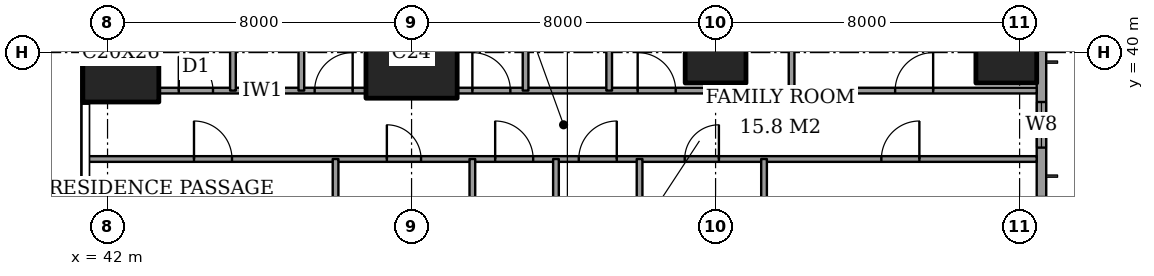
"""IFC4 building model, lengths in metres.
Left out: names, types, materials, properties, quantities, classifications, styles, units other than length and angle.
Written with IfcOpenShell. Run it as: python <this file> out.ifc"""

import sys

from ifc_helpers import new_model, si_unit, direction, frame, frame_2d, origin, origin_2d, place, context, subcontext, project, spatial, rectangle, extrude, element, fill, save


model = new_model("IFC4")
c1 = context("Model", 3, precision=1e-05, world=origin(), true_north=direction((0.0, 1.0)))
c2 = subcontext(c1, "Body", "Model", "MODEL_VIEW")
j1 = project(units=[si_unit("LENGTHUNIT", "METRE"), si_unit("PLANEANGLEUNIT", "RADIAN")], contexts=[c1])
p1 = place(None, origin())
s1 = spatial("IfcSite", under=j1, at=p1, CompositionType="ELEMENT")
p2 = place(p1, origin())
s2 = spatial("IfcBuilding", under=s1, at=p2, CompositionType="ELEMENT")
p3 = place(p2, frame((0.0, 0.0, 262.8)))
s3 = spatial("IfcBuildingStorey", under=s2, at=p3, CompositionType="ELEMENT", Elevation=262.8)
p4 = place(p3, frame((42.35, 40.0, 0.0), z_axis=(0.0, 0.0, 1.0), x_axis=(1.0, 0.0, 0.0)))
e1 = element("IfcColumn", 1, at=p4, inside=s3, PredefinedType="COLUMN", context=c2, shape_type="SweptSolid", body=[
    extrude(rectangle(XDim=2.0, YDim=2.6, at=origin_2d()), origin(), (0.0, 0.0, 1.0), 3.6),
])
p5 = place(p3, frame((50.0, 40.0, 0.0), z_axis=(0.0, 0.0, 1.0), x_axis=(1.0, 0.0, 0.0)))
e2 = element("IfcColumn", 2, at=p5, inside=s3, PredefinedType="COLUMN", context=c2, shape_type="SweptSolid", body=[
    extrude(rectangle(XDim=2.4, YDim=2.4, at=origin_2d()), origin(), (0.0, 0.0, 1.0), 3.6),
])
for number, where, z_axis, x_axis in (
    (3, (58.0, 40.0, 0.0), (0.0, 0.0, 1.0), (1.0, 0.0, 0.0)),
    (4, (65.65, 40.0, 0.0), (0.0, 0.0, 1.0), (1.0, 0.0, 0.0)),
):
    element("IfcColumn", number, at=place(p3, frame(where, z_axis=z_axis, x_axis=x_axis)), inside=s3, PredefinedType="COLUMN", context=c2, shape_type="SweptSolid", body=[
        extrude(rectangle(XDim=1.6, YDim=1.6, at=origin_2d()), origin(), (0.0, 0.0, 1.0), 3.6),
    ])
p6 = place(p3, frame((66.575, 3.175, 0.0), z_axis=(0.0, 0.0, 1.0), x_axis=(0.0, 1.0, 0.0)))
e5 = element("IfcWall", 5, at=p6, inside=s3, PredefinedType="SOLIDWALL", context=c2, shape_type="SweptSolid", body=[
    extrude(rectangle(XDim=41.65, YDim=0.25, at=frame_2d((20.825, 0.0))), origin(), (0.0, 0.0, 1.0), 3.6),
])
p7 = place(p6, frame((0.875, 0.0, 0.6)))
e6 = element("IfcOpeningElement", 6, at=p7, cuts=e5, PredefinedType="OPENING", context=c2, shape_type="SweptSolid", body=[
    extrude(rectangle(XDim=2.4, YDim=2.0, at=frame_2d((1.2, 1.0))), frame((0.0, 0.135, 0.0), z_axis=(0.0, -1.0, 0.0), x_axis=(1.0, 0.0, 0.0)), (0.0, 0.0, 1.0), 0.27),
])
p8 = place(p6, frame((6.0, 0.0, 0.6)))
e7 = element("IfcOpeningElement", 7, at=p8, cuts=e5, PredefinedType="OPENING", context=c2, shape_type="SweptSolid", body=[
    extrude(rectangle(XDim=1.2, YDim=2.0, at=frame_2d((0.6, 1.0))), frame((0.0, 0.135, 0.0), z_axis=(0.0, -1.0, 0.0), x_axis=(1.0, 0.0, 0.0)), (0.0, 0.0, 1.0), 0.27),
])
p9 = place(p6, frame((8.525, 0.0, 0.6)))
e8 = element("IfcOpeningElement", 8, at=p9, cuts=e5, PredefinedType="OPENING", context=c2, shape_type="SweptSolid", body=[
    extrude(rectangle(XDim=2.4, YDim=2.0, at=frame_2d((1.2, 1.0))), frame((0.0, 0.135, 0.0), z_axis=(0.0, -1.0, 0.0), x_axis=(1.0, 0.0, 0.0)), (0.0, 0.0, 1.0), 0.27),
])
p10 = place(p6, frame((15.625, 0.0, 0.6)))
e9 = element("IfcOpeningElement", 9, at=p10, cuts=e5, PredefinedType="OPENING", context=c2, shape_type="SweptSolid", body=[
    extrude(rectangle(XDim=2.4, YDim=2.0, at=frame_2d((1.2, 1.0))), frame((0.0, 0.135, 0.0), z_axis=(0.0, -1.0, 0.0), x_axis=(1.0, 0.0, 0.0)), (0.0, 0.0, 1.0), 0.27),
])
p11 = place(p6, frame((23.525, 0.0, 0.6)))
e10 = element("IfcOpeningElement", 10, at=p11, cuts=e5, PredefinedType="OPENING", context=c2, shape_type="SweptSolid", body=[
    extrude(rectangle(XDim=2.4, YDim=2.0, at=frame_2d((1.2, 1.0))), frame((0.0, 0.135, 0.0), z_axis=(0.0, -1.0, 0.0), x_axis=(1.0, 0.0, 0.0)), (0.0, 0.0, 1.0), 0.27),
])
p12 = place(p6, frame((30.625, 0.0, 0.6)))
e11 = element("IfcOpeningElement", 11, at=p12, cuts=e5, PredefinedType="OPENING", context=c2, shape_type="SweptSolid", body=[
    extrude(rectangle(XDim=2.4, YDim=2.0, at=frame_2d((1.2, 1.0))), frame((0.0, 0.135, 0.0), z_axis=(0.0, -1.0, 0.0), x_axis=(1.0, 0.0, 0.0)), (0.0, 0.0, 1.0), 0.27),
])
p13 = place(p6, frame((34.325, 0.0, 0.6)))
e12 = element("IfcOpeningElement", 12, at=p13, cuts=e5, PredefinedType="OPENING", context=c2, shape_type="SweptSolid", body=[
    extrude(rectangle(XDim=1.2, YDim=2.0, at=frame_2d((0.6, 1.0))), frame((0.0, 0.135, 0.0), z_axis=(0.0, -1.0, 0.0), x_axis=(1.0, 0.0, 0.0)), (0.0, 0.0, 1.0), 0.27),
])
p14 = place(p6, frame((38.375, 0.0, 0.6)))
e13 = element("IfcOpeningElement", 13, at=p14, cuts=e5, PredefinedType="OPENING", context=c2, shape_type="SweptSolid", body=[
    extrude(rectangle(XDim=2.4, YDim=2.0, at=frame_2d((1.2, 1.0))), frame((0.0, 0.135, 0.0), z_axis=(0.0, -1.0, 0.0), x_axis=(1.0, 0.0, 0.0)), (0.0, 0.0, 1.0), 0.27),
])
p15 = place(p3, frame((41.439, 37.2, 0.0), z_axis=(0.0, 0.0, 1.0), x_axis=(1.0, 0.0, 0.0)))
e14 = element("IfcWall", 14, at=p15, inside=s3, PredefinedType="PARTITIONING", context=c2, shape_type="SweptSolid", body=[
    extrude(rectangle(XDim=25.011, YDim=0.15, at=frame_2d((12.505, 0.0))), origin(), (0.0, 0.0, 1.0), 3.35),
])
p16 = place(p15, frame((10.761, 0.0, 0.0)))
e15 = element("IfcOpeningElement", 15, at=p16, cuts=e14, PredefinedType="OPENING", context=c2, shape_type="SweptSolid", body=[
    extrude(rectangle(XDim=1.0, YDim=2.1, at=frame_2d((0.5, 1.05))), frame((0.0, 0.085, 0.0), z_axis=(0.0, -1.0, 0.0), x_axis=(1.0, 0.0, 0.0)), (0.0, 0.0, 1.0), 0.17),
])
p17 = place(p15, frame((20.924, 0.0, 0.0)))
e16 = element("IfcOpeningElement", 16, at=p17, cuts=e14, PredefinedType="OPENING", context=c2, shape_type="SweptSolid", body=[
    extrude(rectangle(XDim=1.0, YDim=2.1, at=frame_2d((0.5, 1.05))), frame((0.0, 0.085, 0.0), z_axis=(0.0, -1.0, 0.0), x_axis=(1.0, 0.0, 0.0)), (0.0, 0.0, 1.0), 0.17),
])
p18 = place(p15, frame((15.749, 0.0, 0.0)))
e17 = element("IfcOpeningElement", 17, at=p18, cuts=e14, PredefinedType="OPENING", context=c2, shape_type="SweptSolid", body=[
    extrude(rectangle(XDim=0.9, YDim=2.1, at=frame_2d((0.45, 1.05))), frame((0.0, 0.085, 0.0), z_axis=(0.0, -1.0, 0.0), x_axis=(1.0, 0.0, 0.0)), (0.0, 0.0, 1.0), 0.17),
])
p19 = place(p15, frame((12.961, 0.0, 0.0)))
e18 = element("IfcOpeningElement", 18, at=p19, cuts=e14, PredefinedType="OPENING", context=c2, shape_type="SweptSolid", body=[
    extrude(rectangle(XDim=1.0, YDim=2.1, at=frame_2d((0.5, 1.05))), frame((0.0, 0.085, 0.0), z_axis=(0.0, -1.0, 0.0), x_axis=(1.0, 0.0, 0.0)), (0.0, 0.0, 1.0), 0.17),
])
p20 = place(p15, frame((7.911, 0.0, 0.0)))
e19 = element("IfcOpeningElement", 19, at=p20, cuts=e14, PredefinedType="OPENING", context=c2, shape_type="SweptSolid", body=[
    extrude(rectangle(XDim=0.9, YDim=2.1, at=frame_2d((0.45, 1.05))), frame((0.0, 0.085, 0.0), z_axis=(0.0, -1.0, 0.0), x_axis=(1.0, 0.0, 0.0)), (0.0, 0.0, 1.0), 0.17),
])
p21 = place(p15, frame((2.836, 0.0, 0.0)))
e20 = element("IfcOpeningElement", 20, at=p21, cuts=e14, PredefinedType="OPENING", context=c2, shape_type="SweptSolid", body=[
    extrude(rectangle(XDim=1.0, YDim=2.1, at=frame_2d((0.5, 1.05))), frame((0.0, 0.085, 0.0), z_axis=(0.0, -1.0, 0.0), x_axis=(1.0, 0.0, 0.0)), (0.0, 0.0, 1.0), 0.17),
])
p22 = place(p3, frame((43.35, 39.0, 0.0), z_axis=(0.0, 0.0, 1.0), x_axis=(1.0, 0.0, 0.0)))
e21 = element("IfcWall", 21, at=p22, inside=s3, PredefinedType="PARTITIONING", context=c2, shape_type="SweptSolid", body=[
    extrude(rectangle(XDim=5.45, YDim=0.15, at=frame_2d((2.725, 0.0))), origin(), (0.0, 0.0, 1.0), 3.35),
])
p23 = place(p22, frame((4.1, 0.0, 0.0)))
e22 = element("IfcOpeningElement", 22, at=p23, cuts=e21, PredefinedType="OPENING", context=c2, shape_type="SweptSolid", body=[
    extrude(rectangle(XDim=1.0, YDim=2.1, at=frame_2d((0.5, 1.05))), frame((0.0, 0.085, 0.0), z_axis=(0.0, -1.0, 0.0), x_axis=(1.0, 0.0, 0.0)), (0.0, 0.0, 1.0), 0.17),
])
p24 = place(p22, frame((0.525, 0.0, 0.0)))
e23 = element("IfcOpeningElement", 23, at=p24, cuts=e21, PredefinedType="OPENING", context=c2, shape_type="SweptSolid", body=[
    extrude(rectangle(XDim=0.9, YDim=2.1, at=frame_2d((0.45, 1.05))), frame((0.0, 0.085, 0.0), z_axis=(0.0, -1.0, 0.0), x_axis=(1.0, 0.0, 0.0)), (0.0, 0.0, 1.0), 0.17),
])
p25 = place(p3, frame((51.2, 39.0, 0.0), z_axis=(0.0, 0.0, 1.0), x_axis=(1.0, 0.0, 0.0)))
e24 = element("IfcWall", 24, at=p25, inside=s3, PredefinedType="PARTITIONING", context=c2, shape_type="SweptSolid", body=[
    extrude(rectangle(XDim=15.25, YDim=0.15, at=frame_2d((7.625, 0.0))), origin(), (0.0, 0.0, 1.0), 3.35),
])
p26 = place(p25, frame((11.525, 0.0, 0.0)))
e25 = element("IfcOpeningElement", 25, at=p26, cuts=e24, PredefinedType="OPENING", context=c2, shape_type="SweptSolid", body=[
    extrude(rectangle(XDim=1.0, YDim=2.1, at=frame_2d((0.5, 1.05))), frame((0.0, 0.085, 0.0), z_axis=(0.0, -1.0, 0.0), x_axis=(1.0, 0.0, 0.0)), (0.0, 0.0, 1.0), 0.17),
])
p27 = place(p25, frame((4.75, 0.0, 0.0)))
e26 = element("IfcOpeningElement", 26, at=p27, cuts=e24, PredefinedType="OPENING", context=c2, shape_type="SweptSolid", body=[
    extrude(rectangle(XDim=1.0, YDim=2.1, at=frame_2d((0.5, 1.05))), frame((0.0, 0.085, 0.0), z_axis=(0.0, -1.0, 0.0), x_axis=(1.0, 0.0, 0.0)), (0.0, 0.0, 1.0), 0.17),
])
p28 = place(p25, frame((0.4, 0.0, 0.0)))
e27 = element("IfcOpeningElement", 27, at=p28, cuts=e24, PredefinedType="OPENING", context=c2, shape_type="SweptSolid", body=[
    extrude(rectangle(XDim=1.0, YDim=2.1, at=frame_2d((0.5, 1.05))), frame((0.0, 0.085, 0.0), z_axis=(0.0, -1.0, 0.0), x_axis=(1.0, 0.0, 0.0)), (0.0, 0.0, 1.0), 0.17),
])
p29 = place(p3, frame((45.3, 39.0, 0.0), z_axis=(0.0, 0.0, 1.0), x_axis=(0.0, 1.0, 0.0)))
e28 = element("IfcWall", 28, at=p29, inside=s3, PredefinedType="PARTITIONING", context=c2, shape_type="SweptSolid", body=[
    extrude(rectangle(XDim=9.45, YDim=0.15, at=frame_2d((4.725, 0.0))), origin(), (0.0, 0.0, 1.0), 3.35),
])
p30 = place(p3, frame((47.1, 39.0, 0.0), z_axis=(0.0, 0.0, 1.0), x_axis=(0.0, 1.0, 0.0)))
e29 = element("IfcWall", 29, at=p30, inside=s3, PredefinedType="PARTITIONING", context=c2, shape_type="SweptSolid", body=[
    extrude(rectangle(XDim=4.7, YDim=0.15, at=frame_2d((2.35, 0.0))), origin(), (0.0, 0.0, 1.0), 3.35),
])
p31 = place(p30, frame((1.9, 0.0, 0.0)))
e30 = element("IfcOpeningElement", 30, at=p31, cuts=e29, PredefinedType="OPENING", context=c2, shape_type="SweptSolid", body=[
    extrude(rectangle(XDim=0.9, YDim=2.1, at=frame_2d((0.45, 1.05))), frame((0.0, 0.085, 0.0), z_axis=(0.0, -1.0, 0.0), x_axis=(1.0, 0.0, 0.0)), (0.0, 0.0, 1.0), 0.17),
])
p32 = place(p3, frame((48.0, 28.0, 0.0), z_axis=(0.0, 0.0, 1.0), x_axis=(0.0, 1.0, 0.0)))
e31 = element("IfcWall", 31, at=p32, inside=s3, PredefinedType="PARTITIONING", context=c2, shape_type="SweptSolid", body=[
    extrude(rectangle(XDim=9.2, YDim=0.15, at=frame_2d((4.6, 0.0))), origin(), (0.0, 0.0, 1.0), 3.35),
])
p33 = place(p32, frame((0.5, 0.0, 0.0)))
e32 = element("IfcOpeningElement", 32, at=p33, cuts=e31, PredefinedType="OPENING", context=c2, shape_type="SweptSolid", body=[
    extrude(rectangle(XDim=1.0, YDim=2.1, at=frame_2d((0.5, 1.05))), frame((0.0, 0.085, 0.0), z_axis=(0.0, -1.0, 0.0), x_axis=(1.0, 0.0, 0.0)), (0.0, 0.0, 1.0), 0.17),
])
p34 = place(p3, frame((51.6, 30.0, 0.0), z_axis=(0.0, 0.0, 1.0), x_axis=(0.0, 1.0, 0.0)))
e33 = element("IfcWall", 33, at=p34, inside=s3, PredefinedType="PARTITIONING", context=c2, shape_type="SweptSolid", body=[
    extrude(rectangle(XDim=7.2, YDim=0.15, at=frame_2d((3.6, 0.0))), origin(), (0.0, 0.0, 1.0), 3.35),
])
p35 = place(p3, frame((53.0, 39.0, 0.0), z_axis=(0.0, 0.0, 1.0), x_axis=(0.0, 1.0, 0.0)))
e34 = element("IfcWall", 34, at=p35, inside=s3, PredefinedType="PARTITIONING", context=c2, shape_type="SweptSolid", body=[
    extrude(rectangle(XDim=9.45, YDim=0.15, at=frame_2d((4.725, 0.0))), origin(), (0.0, 0.0, 1.0), 3.35),
])
p36 = place(p3, frame((53.8, 30.0, 0.0), z_axis=(0.0, 0.0, 1.0), x_axis=(0.0, 1.0, 0.0)))
e35 = element("IfcWall", 35, at=p36, inside=s3, PredefinedType="PARTITIONING", context=c2, shape_type="SweptSolid", body=[
    extrude(rectangle(XDim=7.2, YDim=0.15, at=frame_2d((3.6, 0.0))), origin(), (0.0, 0.0, 1.0), 3.35),
])
p37 = place(p3, frame((55.2, 39.0, 0.0), z_axis=(0.0, 0.0, 1.0), x_axis=(0.0, 1.0, 0.0)))
e36 = element("IfcWall", 36, at=p37, inside=s3, PredefinedType="PARTITIONING", context=c2, shape_type="SweptSolid", body=[
    extrude(rectangle(XDim=3.4, YDim=0.15, at=frame_2d((1.7, 0.0))), origin(), (0.0, 0.0, 1.0), 3.35),
])
p38 = place(p37, frame((1.25, 0.0, 0.0)))
e37 = element("IfcOpeningElement", 37, at=p38, cuts=e36, PredefinedType="OPENING", context=c2, shape_type="SweptSolid", body=[
    extrude(rectangle(XDim=0.9, YDim=2.1, at=frame_2d((0.45, 1.05))), frame((0.0, 0.085, 0.0), z_axis=(0.0, -1.0, 0.0), x_axis=(1.0, 0.0, 0.0)), (0.0, 0.0, 1.0), 0.17),
])
p39 = place(p3, frame((56.0, 28.0, 0.0), z_axis=(0.0, 0.0, 1.0), x_axis=(0.0, 1.0, 0.0)))
e38 = element("IfcWall", 38, at=p39, inside=s3, PredefinedType="PARTITIONING", context=c2, shape_type="SweptSolid", body=[
    extrude(rectangle(XDim=9.2, YDim=0.15, at=frame_2d((4.6, 0.0))), origin(), (0.0, 0.0, 1.0), 3.35),
])
p40 = place(p39, frame((0.5, 0.0, 0.0)))
e39 = element("IfcOpeningElement", 39, at=p40, cuts=e38, PredefinedType="OPENING", context=c2, shape_type="SweptSolid", body=[
    extrude(rectangle(XDim=1.0, YDim=2.1, at=frame_2d((0.5, 1.05))), frame((0.0, 0.085, 0.0), z_axis=(0.0, -1.0, 0.0), x_axis=(1.0, 0.0, 0.0)), (0.0, 0.0, 1.0), 0.17),
])
p41 = place(p3, frame((59.275, 33.2, 0.0), z_axis=(0.0, 0.0, 1.0), x_axis=(0.0, 1.0, 0.0)))
e40 = element("IfcWall", 40, at=p41, inside=s3, PredefinedType="PARTITIONING", context=c2, shape_type="SweptSolid", body=[
    extrude(rectangle(XDim=4.0, YDim=0.15, at=frame_2d((2.0, 0.0))), origin(), (0.0, 0.0, 1.0), 3.35),
])
p42 = place(p3, frame((60.0, 39.0, 0.0), z_axis=(0.0, 0.0, 1.0), x_axis=(0.0, 1.0, 0.0)))
e41 = element("IfcWall", 41, at=p42, inside=s3, PredefinedType="PARTITIONING", context=c2, shape_type="SweptSolid", body=[
    extrude(rectangle(XDim=9.45, YDim=0.15, at=frame_2d((4.725, 0.0))), origin(), (0.0, 0.0, 1.0), 3.35),
])
p43 = place(p13, origin())
e42 = element("IfcWindow", 42, at=p43, inside=s3, PartitioningType="SINGLE_PANEL", PredefinedType="WINDOW", context=c2, shape_type="SweptSolid", body=[
    extrude(rectangle(XDim=1.2, YDim=2.0, at=frame_2d((0.6, 1.0))), frame((0.0, 0.03, 0.0), z_axis=(0.0, -1.0, 0.0), x_axis=(1.0, 0.0, 0.0)), (0.0, 0.0, 1.0), 0.06),
])
fill(e12, e42)
p44 = place(p26, origin())
e43 = element("IfcDoor", 43, at=p44, inside=s3, OperationType="SINGLE_SWING_LEFT", PredefinedType="DOOR", context=c2, shape_type="SweptSolid", body=[
    extrude(rectangle(XDim=1.0, YDim=2.1, at=frame_2d((0.5, 1.05))), frame((0.0, 0.025, 0.0), z_axis=(0.0, -1.0, 0.0), x_axis=(1.0, 0.0, 0.0)), (0.0, 0.0, 1.0), 0.05),
])
fill(e25, e43)
p45 = place(p27, origin())
e44 = element("IfcDoor", 44, at=p45, inside=s3, OperationType="SINGLE_SWING_RIGHT", PredefinedType="DOOR", context=c2, shape_type="SweptSolid", body=[
    extrude(rectangle(XDim=1.0, YDim=2.1, at=frame_2d((0.5, 1.05))), frame((0.0, 0.025, 0.0), z_axis=(0.0, -1.0, 0.0), x_axis=(1.0, 0.0, 0.0)), (0.0, 0.0, 1.0), 0.05),
])
fill(e26, e44)
p46 = place(p28, origin())
e45 = element("IfcDoor", 45, at=p46, inside=s3, OperationType="SINGLE_SWING_RIGHT", PredefinedType="DOOR", context=c2, shape_type="SweptSolid", body=[
    extrude(rectangle(XDim=1.0, YDim=2.1, at=frame_2d((0.5, 1.05))), frame((0.0, 0.025, 0.0), z_axis=(0.0, -1.0, 0.0), x_axis=(1.0, 0.0, 0.0)), (0.0, 0.0, 1.0), 0.05),
])
fill(e27, e45)
p47 = place(p23, origin())
e46 = element("IfcDoor", 46, at=p47, inside=s3, OperationType="SINGLE_SWING_LEFT", PredefinedType="DOOR", context=c2, shape_type="SweptSolid", body=[
    extrude(rectangle(XDim=1.0, YDim=2.1, at=frame_2d((0.5, 1.05))), frame((0.0, 0.025, 0.0), z_axis=(0.0, -1.0, 0.0), x_axis=(1.0, 0.0, 0.0)), (0.0, 0.0, 1.0), 0.05),
])
fill(e22, e46)
p48 = place(p24, origin())
e47 = element("IfcDoor", 47, at=p48, inside=s3, OperationType="SINGLE_SWING_RIGHT", PredefinedType="DOOR", context=c2, shape_type="SweptSolid", body=[
    extrude(rectangle(XDim=0.9, YDim=2.1, at=frame_2d((0.45, 1.05))), frame((0.0, 0.025, 0.0), z_axis=(0.0, -1.0, 0.0), x_axis=(1.0, 0.0, 0.0)), (0.0, 0.0, 1.0), 0.05),
])
fill(e23, e47)
p49 = place(p16, origin())
e48 = element("IfcDoor", 48, at=p49, inside=s3, OperationType="SINGLE_SWING_RIGHT", PredefinedType="DOOR", context=c2, shape_type="SweptSolid", body=[
    extrude(rectangle(XDim=1.0, YDim=2.1, at=frame_2d((0.5, 1.05))), frame((0.0, 0.025, 0.0), z_axis=(0.0, -1.0, 0.0), x_axis=(1.0, 0.0, 0.0)), (0.0, 0.0, 1.0), 0.05),
])
fill(e15, e48)
p50 = place(p17, origin())
e49 = element("IfcDoor", 49, at=p50, inside=s3, OperationType="SINGLE_SWING_LEFT", PredefinedType="DOOR", context=c2, shape_type="SweptSolid", body=[
    extrude(rectangle(XDim=1.0, YDim=2.1, at=frame_2d((0.5, 1.05))), frame((0.0, 0.025, 0.0), z_axis=(0.0, -1.0, 0.0), x_axis=(1.0, 0.0, 0.0)), (0.0, 0.0, 1.0), 0.05),
])
fill(e16, e49)
p51 = place(p18, origin())
e50 = element("IfcDoor", 50, at=p51, inside=s3, OperationType="SINGLE_SWING_LEFT", PredefinedType="DOOR", context=c2, shape_type="SweptSolid", body=[
    extrude(rectangle(XDim=0.9, YDim=2.1, at=frame_2d((0.45, 1.05))), frame((0.0, 0.025, 0.0), z_axis=(0.0, -1.0, 0.0), x_axis=(1.0, 0.0, 0.0)), (0.0, 0.0, 1.0), 0.05),
])
fill(e17, e50)
p52 = place(p19, origin())
e51 = element("IfcDoor", 51, at=p52, inside=s3, OperationType="SINGLE_SWING_LEFT", PredefinedType="DOOR", context=c2, shape_type="SweptSolid", body=[
    extrude(rectangle(XDim=1.0, YDim=2.1, at=frame_2d((0.5, 1.05))), frame((0.0, 0.025, 0.0), z_axis=(0.0, -1.0, 0.0), x_axis=(1.0, 0.0, 0.0)), (0.0, 0.0, 1.0), 0.05),
])
fill(e18, e51)
p53 = place(p20, origin())
e52 = element("IfcDoor", 52, at=p53, inside=s3, OperationType="SINGLE_SWING_RIGHT", PredefinedType="DOOR", context=c2, shape_type="SweptSolid", body=[
    extrude(rectangle(XDim=0.9, YDim=2.1, at=frame_2d((0.45, 1.05))), frame((0.0, 0.025, 0.0), z_axis=(0.0, -1.0, 0.0), x_axis=(1.0, 0.0, 0.0)), (0.0, 0.0, 1.0), 0.05),
])
fill(e19, e52)
p54 = place(p21, origin())
e53 = element("IfcDoor", 53, at=p54, inside=s3, OperationType="SINGLE_SWING_RIGHT", PredefinedType="DOOR", context=c2, shape_type="SweptSolid", body=[
    extrude(rectangle(XDim=1.0, YDim=2.1, at=frame_2d((0.5, 1.05))), frame((0.0, 0.025, 0.0), z_axis=(0.0, -1.0, 0.0), x_axis=(1.0, 0.0, 0.0)), (0.0, 0.0, 1.0), 0.05),
])
fill(e20, e53)
save(model, sys.argv[1])
